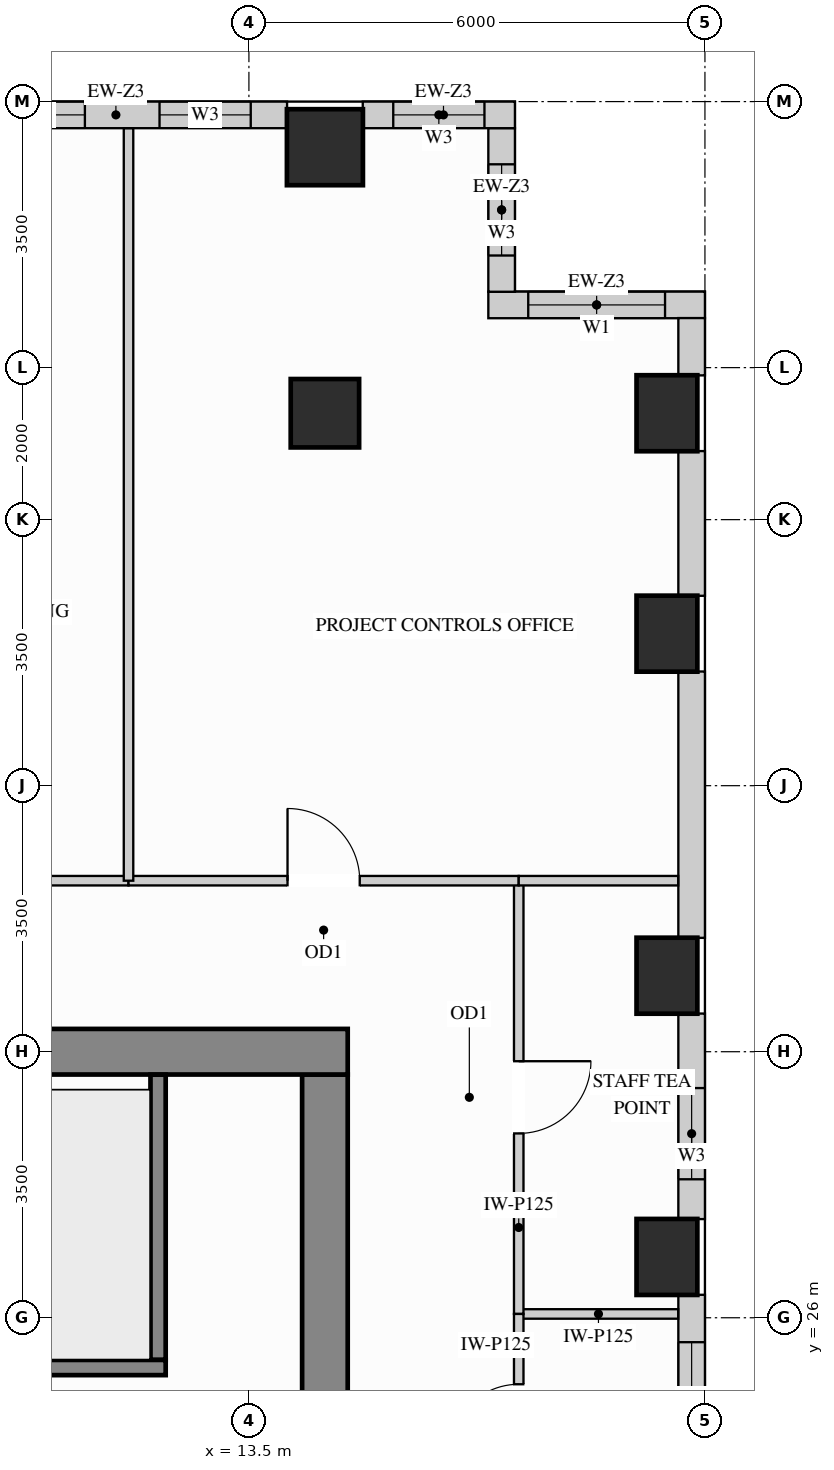
"""IFC4 building model, lengths in metres.
Left out: names, types, materials, properties, quantities, classifications, styles, units other than length and angle.
Written with IfcOpenShell. Run it as: python <this file> out.ifc"""

import sys

from ifc_helpers import new_model, si_unit, direction, frame, frame_2d, origin, origin_2d, place, context, subcontext, project, spatial, rectangle, extrude, source, transform, mapped, element, fill, save


model = new_model("IFC4")
c1 = context("Model", 3, precision=1e-05, world=origin(), true_north=direction((0.0, 1.0)))
c2 = subcontext(c1, "Body", "Model", "MODEL_VIEW")
j1 = project(units=[si_unit("LENGTHUNIT", "METRE"), si_unit("PLANEANGLEUNIT", "RADIAN")], contexts=[c1])
p1 = place(None, origin())
s1 = spatial("IfcSite", under=j1, at=p1, CompositionType="ELEMENT")
p2 = place(p1, origin())
s2 = spatial("IfcBuilding", under=s1, at=p2, CompositionType="ELEMENT")
p3 = place(p2, frame((0.0, 0.0, 175.5)))
s3 = spatial("IfcBuildingStorey", under=s2, at=p3, CompositionType="ELEMENT", Elevation=175.5)
m1 = source(origin(), c2, "Body", "SweptSolid", [
    extrude(rectangle(XDim=0.9, YDim=0.9, at=origin_2d()), origin(), (0.0, 0.0, 1.0), 3.4),
])
p4 = place(p3, frame((14.5, 37.9, 0.0), z_axis=(0.0, 0.0, 1.0), x_axis=(1.0, 0.0, 0.0)))
e1 = element("IfcColumn", 1, at=p4, inside=s3, PredefinedType="COLUMN", context=c2, shape_type="MappedRepresentation", body=[
    mapped(m1, transform((0.0, 0.0, 0.0), x_axis=(1.0, 0.0, 0.0), y_axis=(0.0, 1.0, 0.0), z_axis=(0.0, 0.0, 1.0))),
])
m2 = source(origin(), c2, "Body", "SweptSolid", [
    extrude(rectangle(XDim=0.8, YDim=1.0, at=origin_2d()), origin(), (0.0, 0.0, 1.0), 3.4),
])
for number, where, z_axis, x_axis in (
    (2, (19.0, 26.8, 0.0), (0.0, 0.0, 1.0), (1.0, 0.0, 0.0)),
    (3, (19.0, 30.5, 0.0), (0.0, 0.0, 1.0), (1.0, 0.0, 0.0)),
    (4, (19.0, 35.0, 0.0), (0.0, 0.0, 1.0), (1.0, 0.0, 0.0)),
    (5, (19.0, 37.9, 0.0), (0.0, 0.0, 1.0), (1.0, 0.0, 0.0)),
):
    element("IfcColumn", number, at=place(p3, frame(where, z_axis=z_axis, x_axis=x_axis)), inside=s3, PredefinedType="COLUMN", context=c2, shape_type="MappedRepresentation", body=[
        mapped(m2, transform((0.0, 0.0, 0.0), x_axis=(1.0, 0.0, 0.0), y_axis=(0.0, 1.0, 0.0), z_axis=(0.0, 0.0, 1.0))),
    ])
m3 = source(origin(), c2, "Body", "SweptSolid", [
    extrude(rectangle(XDim=1.0, YDim=1.0, at=origin_2d()), origin(), (0.0, 0.0, 1.0), 3.4),
])
p5 = place(p3, frame((14.5, 41.4, 0.0), z_axis=(0.0, 0.0, 1.0), x_axis=(1.0, 0.0, 0.0)))
e6 = element("IfcColumn", 6, at=p5, inside=s3, PredefinedType="COLUMN", context=c2, shape_type="MappedRepresentation", body=[
    mapped(m3, transform((0.0, 0.0, 0.0), x_axis=(1.0, 0.0, 0.0), y_axis=(0.0, 1.0, 0.0), z_axis=(0.0, 0.0, 1.0))),
])
m4 = source(origin(), c2, "Body", "SweptSolid", [
    extrude(rectangle(XDim=8.32, YDim=0.6, at=frame_2d((4.16, 0.0))), origin(), (0.0, 0.0, 1.0), 3.4),
])
p6 = place(p3, frame((14.5, 20.88, 0.0), z_axis=(0.0, 0.0, 1.0), x_axis=(0.0, 1.0, 0.0)))
e7 = element("IfcWall", 7, at=p6, inside=s3, PredefinedType="SHEAR", context=c2, shape_type="MappedRepresentation", body=[
    mapped(m4, transform((0.0, 0.0, 0.0), x_axis=(1.0, 0.0, 0.0), y_axis=(0.0, 1.0, 0.0), z_axis=(0.0, 0.0, 1.0))),
])
m5 = source(origin(), c2, "Body", "SweptSolid", [
    extrude(rectangle(XDim=10.6, YDim=0.6, at=frame_2d((5.3, 0.0))), origin(), (0.0, 0.0, 1.0), 3.4),
])
p7 = place(p3, frame((4.2, 29.5, 0.0), z_axis=(0.0, 0.0, 1.0), x_axis=(1.0, 0.0, 0.0)))
e8 = element("IfcWall", 8, at=p7, inside=s3, PredefinedType="SHEAR", context=c2, shape_type="MappedRepresentation", body=[
    mapped(m5, transform((0.0, 0.0, 0.0), x_axis=(1.0, 0.0, 0.0), y_axis=(0.0, 1.0, 0.0), z_axis=(0.0, 0.0, 1.0))),
])
p8 = place(p3, frame((19.5, 39.325, 0.0), z_axis=(0.0, 0.0, 1.0), x_axis=(-1.0, 0.0, 0.0)))
e9 = element("IfcWall", 9, at=p8, inside=s3, PredefinedType="SOLIDWALL", context=c2, shape_type="SweptSolid", body=[
    extrude(rectangle(XDim=2.85, YDim=0.35, at=frame_2d((1.425, 0.0))), origin(), (0.0, 0.0, 1.0), 3.385),
])
p9 = place(p8, frame((0.525, 0.0, 0.78)))
e10 = element("IfcOpeningElement", 10, at=p9, cuts=e9, PredefinedType="OPENING", context=c2, shape_type="SweptSolid", body=[
    extrude(rectangle(XDim=1.8, YDim=2.1, at=frame_2d((0.9, 1.05))), frame((0.0, 0.185, 0.0), z_axis=(0.0, -1.0, 0.0), x_axis=(1.0, 0.0, 0.0)), (0.0, 0.0, 1.0), 0.37),
])
p10 = place(p3, frame((16.825, 39.498, 0.0), z_axis=(0.0, 0.0, 1.0), x_axis=(0.0, 1.0, 0.0)))
e11 = element("IfcWall", 11, at=p10, inside=s3, PredefinedType="SOLIDWALL", context=c2, shape_type="SweptSolid", body=[
    extrude(rectangle(XDim=2.154, YDim=0.35, at=frame_2d((1.077, 0.0))), origin(), (0.0, 0.0, 1.0), 3.385),
])
p11 = place(p10, frame((0.477, 0.0, 0.78)))
e12 = element("IfcOpeningElement", 12, at=p11, cuts=e11, PredefinedType="OPENING", context=c2, shape_type="SweptSolid", body=[
    extrude(rectangle(XDim=1.2, YDim=2.1, at=frame_2d((0.6, 1.05))), frame((0.0, 0.185, 0.0), z_axis=(0.0, -1.0, 0.0), x_axis=(1.0, 0.0, 0.0)), (0.0, 0.0, 1.0), 0.37),
])
p12 = place(p3, frame((17.0, 41.825, 0.0), z_axis=(0.0, 0.0, 1.0), x_axis=(-1.0, 0.0, 0.0)))
e13 = element("IfcWall", 13, at=p12, inside=s3, PredefinedType="SOLIDWALL", context=c2, shape_type="SweptSolid", body=[
    extrude(rectangle(XDim=2.002, YDim=0.35, at=frame_2d((1.001, 0.0))), origin(), (0.0, 0.0, 1.0), 3.385),
])
p13 = place(p12, frame((0.401, 0.0, 0.78)))
e14 = element("IfcOpeningElement", 14, at=p13, cuts=e13, PredefinedType="OPENING", context=c2, shape_type="SweptSolid", body=[
    extrude(rectangle(XDim=1.2, YDim=2.1, at=frame_2d((0.6, 1.05))), frame((0.0, 0.185, 0.0), z_axis=(0.0, -1.0, 0.0), x_axis=(1.0, 0.0, 0.0)), (0.0, 0.0, 1.0), 0.37),
])
p14 = place(p3, frame((14.002, 41.825, 0.0), z_axis=(0.0, 0.0, 1.0), x_axis=(-1.0, 0.0, 0.0)))
e15 = element("IfcWall", 15, at=p14, inside=s3, PredefinedType="SOLIDWALL", context=c2, shape_type="SweptSolid", body=[
    extrude(rectangle(XDim=4.504, YDim=0.35, at=frame_2d((2.252, 0.0))), origin(), (0.0, 0.0, 1.0), 2.612),
])
p15 = place(p14, frame((0.478, 0.0, 0.78)))
e16 = element("IfcOpeningElement", 16, at=p15, cuts=e15, PredefinedType="OPENING", context=c2, shape_type="SweptSolid", body=[
    extrude(rectangle(XDim=1.2, YDim=1.652, at=frame_2d((0.6, 0.826))), frame((0.0, 0.185, 0.0), z_axis=(0.0, -1.0, 0.0), x_axis=(1.0, 0.0, 0.0)), (0.0, 0.0, 1.0), 0.37),
])
p16 = place(p14, frame((2.66, 0.0, 0.78)))
e17 = element("IfcOpeningElement", 17, at=p16, cuts=e15, PredefinedType="OPENING", context=c2, shape_type="SweptSolid", body=[
    extrude(rectangle(XDim=1.2, YDim=1.652, at=frame_2d((0.6, 0.826))), frame((0.0, 0.185, 0.0), z_axis=(0.0, -1.0, 0.0), x_axis=(1.0, 0.0, 0.0)), (0.0, 0.0, 1.0), 0.37),
])
p17 = place(p3, frame((19.325, 22.998, 0.0), z_axis=(0.0, 0.0, 1.0), x_axis=(0.0, 1.0, 0.0)))
e18 = element("IfcWall", 18, at=p17, inside=s3, PredefinedType="SOLIDWALL", context=c2, shape_type="SweptSolid", body=[
    extrude(rectangle(XDim=3.304, YDim=0.35, at=frame_2d((1.652, 0.0))), origin(), (0.0, 0.0, 1.0), 2.612),
])
p18 = place(p17, frame((1.18, 0.0, 0.78)))
e19 = element("IfcOpeningElement", 19, at=p18, cuts=e18, PredefinedType="OPENING", context=c2, shape_type="SweptSolid", body=[
    extrude(rectangle(XDim=1.5, YDim=1.652, at=frame_2d((0.75, 0.826))), frame((0.0, 0.185, 0.0), z_axis=(0.0, -1.0, 0.0), x_axis=(1.0, 0.0, 0.0)), (0.0, 0.0, 1.0), 0.37),
])
p19 = place(p3, frame((19.325, 27.298, 0.0), z_axis=(0.0, 0.0, 1.0), x_axis=(0.0, 1.0, 0.0)))
e20 = element("IfcWall", 20, at=p19, inside=s3, PredefinedType="SOLIDWALL", context=c2, shape_type="SweptSolid", body=[
    extrude(rectangle(XDim=2.704, YDim=0.35, at=frame_2d((1.352, 0.0))), origin(), (0.0, 0.0, 1.0), 2.612),
])
p20 = place(p19, frame((0.524, 0.0, 0.78)))
e21 = element("IfcOpeningElement", 21, at=p20, cuts=e20, PredefinedType="OPENING", context=c2, shape_type="SweptSolid", body=[
    extrude(rectangle(XDim=1.2, YDim=1.652, at=frame_2d((0.6, 0.826))), frame((0.0, 0.185, 0.0), z_axis=(0.0, -1.0, 0.0), x_axis=(1.0, 0.0, 0.0)), (0.0, 0.0, 1.0), 0.37),
])
m6 = source(origin(), c2, "Body", "SweptSolid", [
    extrude(rectangle(XDim=3.504, YDim=0.35, at=frame_2d((1.752, 0.0))), origin(), (0.0, 0.0, 1.0), 2.612),
])
p21 = place(p3, frame((19.325, 30.998, 0.0), z_axis=(0.0, 0.0, 1.0), x_axis=(0.0, 1.0, 0.0)))
e22 = element("IfcWall", 22, at=p21, inside=s3, PredefinedType="SOLIDWALL", context=c2, shape_type="MappedRepresentation", body=[
    mapped(m6, transform((0.0, 0.0, 0.0), x_axis=(1.0, 0.0, 0.0), y_axis=(0.0, 1.0, 0.0), z_axis=(0.0, 0.0, 1.0))),
])
m7 = source(origin(), c2, "Body", "SweptSolid", [
    extrude(rectangle(XDim=1.904, YDim=0.35, at=frame_2d((0.952, 0.0))), origin(), (0.0, 0.0, 1.0), 2.612),
])
p22 = place(p3, frame((19.325, 35.498, 0.0), z_axis=(0.0, 0.0, 1.0), x_axis=(0.0, 1.0, 0.0)))
e23 = element("IfcWall", 23, at=p22, inside=s3, PredefinedType="SOLIDWALL", context=c2, shape_type="MappedRepresentation", body=[
    mapped(m7, transform((0.0, 0.0, 0.0), x_axis=(1.0, 0.0, 0.0), y_axis=(0.0, 1.0, 0.0), z_axis=(0.0, 0.0, 1.0))),
])
m8 = source(origin(), c2, "Body", "SweptSolid", [
    extrude(rectangle(XDim=0.754, YDim=0.35, at=frame_2d((0.377, 0.0))), origin(), (0.0, 0.0, 1.0), 3.385),
])
p23 = place(p3, frame((19.325, 38.398, 0.0), z_axis=(0.0, 0.0, 1.0), x_axis=(0.0, 1.0, 0.0)))
e24 = element("IfcWall", 24, at=p23, inside=s3, PredefinedType="SOLIDWALL", context=c2, shape_type="MappedRepresentation", body=[
    mapped(m8, transform((0.0, 0.0, 0.0), x_axis=(1.0, 0.0, 0.0), y_axis=(0.0, 1.0, 0.0), z_axis=(0.0, 0.0, 1.0))),
])
m9 = source(origin(), c2, "Body", "SweptSolid", [
    extrude(rectangle(XDim=2.098, YDim=0.125, at=frame_2d((1.049, 0.0))), origin(), (0.0, 0.0, 1.0), 3.385),
])
p24 = place(p3, frame((17.05, 26.05, 0.0), z_axis=(0.0, 0.0, 1.0), x_axis=(1.0, 0.0, 0.0)))
e25 = element("IfcWall", 25, at=p24, inside=s3, PredefinedType="PARTITIONING", context=c2, shape_type="MappedRepresentation", body=[
    mapped(m9, transform((0.0, 0.0, 0.0), x_axis=(1.0, 0.0, 0.0), y_axis=(0.0, 1.0, 0.0), z_axis=(0.0, 0.0, 1.0))),
])
p25 = place(p3, frame((17.05, 26.05, 0.0), z_axis=(0.0, 0.0, 1.0), x_axis=(0.0, 1.0, 0.0)))
e26 = element("IfcWall", 26, at=p25, inside=s3, PredefinedType="PARTITIONING", context=c2, shape_type="SweptSolid", body=[
    extrude(rectangle(XDim=5.7, YDim=0.125, at=frame_2d((2.85, 0.0))), origin(), (0.0, 0.0, 1.0), 3.385),
])
p26 = place(p25, frame((2.375, 0.0, 0.0)))
e27 = element("IfcOpeningElement", 27, at=p26, cuts=e26, PredefinedType="OPENING", context=c2, shape_type="SweptSolid", body=[
    extrude(rectangle(XDim=0.95, YDim=2.15, at=frame_2d((0.475, 1.075))), frame((0.0, 0.073, 0.0), z_axis=(0.0, -1.0, 0.0), x_axis=(1.0, 0.0, 0.0)), (0.0, 0.0, 1.0), 0.145),
])
p27 = place(p3, frame((17.05, 23.35, 0.0), z_axis=(0.0, 0.0, 1.0), x_axis=(0.0, 1.0, 0.0)))
e28 = element("IfcWall", 28, at=p27, inside=s3, PredefinedType="PARTITIONING", context=c2, shape_type="SweptSolid", body=[
    extrude(rectangle(XDim=2.7, YDim=0.125, at=frame_2d((1.35, 0.0))), origin(), (0.0, 0.0, 1.0), 3.385),
])
p28 = place(p27, frame((0.875, 0.0, 0.0)))
e29 = element("IfcOpeningElement", 29, at=p28, cuts=e28, PredefinedType="OPENING", context=c2, shape_type="SweptSolid", body=[
    extrude(rectangle(XDim=0.9, YDim=2.15, at=frame_2d((0.45, 1.075))), frame((0.0, 0.073, 0.0), z_axis=(0.0, -1.0, 0.0), x_axis=(1.0, 0.0, 0.0)), (0.0, 0.0, 1.0), 0.145),
])
p29 = place(p3, frame((7.121, 31.75, 0.0), z_axis=(0.0, 0.0, 1.0), x_axis=(1.0, 0.0, 0.0)))
e30 = element("IfcWall", 30, at=p29, inside=s3, PredefinedType="PARTITIONING", context=c2, shape_type="SweptSolid", body=[
    extrude(rectangle(XDim=4.795, YDim=0.125, at=frame_2d((2.397, 0.0))), origin(), (0.0, 0.0, 1.0), 2.848),
])
p30 = place(p29, frame((1.923, 0.0, 0.0)))
e31 = element("IfcOpeningElement", 31, at=p30, cuts=e30, PredefinedType="OPENING", context=c2, shape_type="SweptSolid", body=[
    extrude(rectangle(XDim=0.95, YDim=2.15, at=frame_2d((0.475, 1.075))), frame((0.0, 0.073, 0.0), z_axis=(0.0, -1.0, 0.0), x_axis=(1.0, 0.0, 0.0)), (0.0, 0.0, 1.0), 0.145),
])
p31 = place(p3, frame((11.916, 31.75, 0.0), z_axis=(0.0, 0.0, 1.0), x_axis=(1.0, 0.0, 0.0)))
e32 = element("IfcWall", 32, at=p31, inside=s3, PredefinedType="PARTITIONING", context=c2, shape_type="SweptSolid", body=[
    extrude(rectangle(XDim=5.134, YDim=0.125, at=frame_2d((2.567, 0.0))), origin(), (0.0, 0.0, 1.0), 2.848),
])
p32 = place(p31, frame((2.092, 0.0, 0.0)))
e33 = element("IfcOpeningElement", 33, at=p32, cuts=e32, PredefinedType="OPENING", context=c2, shape_type="SweptSolid", body=[
    extrude(rectangle(XDim=0.95, YDim=2.15, at=frame_2d((0.475, 1.075))), frame((0.0, 0.073, 0.0), z_axis=(0.0, -1.0, 0.0), x_axis=(1.0, 0.0, 0.0)), (0.0, 0.0, 1.0), 0.145),
])
m10 = source(origin(), c2, "Body", "SweptSolid", [
    extrude(rectangle(XDim=2.098, YDim=0.125, at=frame_2d((1.049, 0.0))), origin(), (0.0, 0.0, 1.0), 2.848),
])
p33 = place(p3, frame((17.05, 31.75, 0.0), z_axis=(0.0, 0.0, 1.0), x_axis=(1.0, 0.0, 0.0)))
e34 = element("IfcWall", 34, at=p33, inside=s3, PredefinedType="PARTITIONING", context=c2, shape_type="MappedRepresentation", body=[
    mapped(m10, transform((0.0, 0.0, 0.0), x_axis=(1.0, 0.0, 0.0), y_axis=(0.0, 1.0, 0.0), z_axis=(0.0, 0.0, 1.0))),
])
m11 = source(origin(), c2, "Body", "SweptSolid", [
    extrude(rectangle(XDim=9.898, YDim=0.125, at=frame_2d((4.949, 0.0))), origin(), (0.0, 0.0, 1.0), 3.385),
])
p34 = place(p3, frame((11.916, 31.75, 0.0), z_axis=(0.0, 0.0, 1.0), x_axis=(0.0, 1.0, 0.0)))
e35 = element("IfcWall", 35, at=p34, inside=s3, PredefinedType="PARTITIONING", context=c2, shape_type="MappedRepresentation", body=[
    mapped(m11, transform((0.0, 0.0, 0.0), x_axis=(1.0, 0.0, 0.0), y_axis=(0.0, 1.0, 0.0), z_axis=(0.0, 0.0, 1.0))),
])
m12 = source(origin(), c2, "Body", "SweptSolid", [
    extrude(rectangle(XDim=3.753, YDim=0.2, at=frame_2d((1.876, 0.0))), origin(), (0.0, 0.0, 1.0), 3.4),
])
p35 = place(p3, frame((12.305, 25.445, 0.0), z_axis=(0.0, 0.0, 1.0), x_axis=(0.0, 1.0, 0.0)))
e36 = element("IfcWall", 36, at=p35, inside=s3, PredefinedType="SHEAR", context=c2, shape_type="MappedRepresentation", body=[
    mapped(m12, transform((0.0, 0.0, 0.0), x_axis=(1.0, 0.0, 0.0), y_axis=(0.0, 1.0, 0.0), z_axis=(0.0, 0.0, 1.0))),
])
p36 = place(p3, frame((4.802, 25.345, 0.0), z_axis=(0.0, 0.0, 1.0), x_axis=(1.0, 0.0, 0.0)))
e37 = element("IfcWall", 37, at=p36, inside=s3, PredefinedType="SHEAR", context=c2, shape_type="SweptSolid", body=[
    extrude(rectangle(XDim=7.603, YDim=0.2, at=frame_2d((3.802, 0.0))), origin(), (0.0, 0.0, 1.0), 3.4),
])
p37 = place(p36, frame((0.4, 0.0, 0.0)))
e38 = element("IfcOpeningElement", 38, at=p37, cuts=e37, PredefinedType="OPENING", context=c2, shape_type="SweptSolid", body=[
    extrude(rectangle(XDim=1.1, YDim=2.15, at=frame_2d((0.55, 1.075))), frame((0.0, 0.11, 0.0), z_axis=(0.0, -1.0, 0.0), x_axis=(1.0, 0.0, 0.0)), (0.0, 0.0, 1.0), 0.22),
])
m13 = source(origin(), c2, "Body", "SweptSolid", [
    extrude(rectangle(XDim=0.95, YDim=2.15, at=frame_2d((0.475, 1.075))), frame((0.0, 0.025, 0.0), z_axis=(0.0, -1.0, 0.0), x_axis=(1.0, 0.0, 0.0)), (0.0, 0.0, 1.0), 0.05),
])
p38 = place(p26, origin())
e39 = element("IfcDoor", 39, at=p38, inside=s3, OperationType="SINGLE_SWING_RIGHT", PredefinedType="DOOR", context=c2, shape_type="MappedRepresentation", body=[
    mapped(m13, transform((0.0, 0.0, 0.0), x_axis=(1.0, 0.0, 0.0), y_axis=(0.0, 1.0, 0.0), z_axis=(0.0, 0.0, 1.0))),
])
fill(e27, e39)
p39 = place(p32, origin())
e40 = element("IfcDoor", 40, at=p39, inside=s3, OperationType="SINGLE_SWING_LEFT", PredefinedType="DOOR", context=c2, shape_type="MappedRepresentation", body=[
    mapped(m13, transform((0.0, 0.0, 0.0), x_axis=(1.0, 0.0, 0.0), y_axis=(0.0, 1.0, 0.0), z_axis=(0.0, 0.0, 1.0))),
])
fill(e33, e40)
m14 = source(origin(), c2, "Body", "SweptSolid", [
    extrude(rectangle(XDim=0.9, YDim=2.15, at=frame_2d((0.45, 1.075))), frame((0.0, 0.025, 0.0), z_axis=(0.0, -1.0, 0.0), x_axis=(1.0, 0.0, 0.0)), (0.0, 0.0, 1.0), 0.05),
])
p40 = place(p28, origin())
e41 = element("IfcDoor", 41, at=p40, inside=s3, OperationType="SINGLE_SWING_LEFT", PredefinedType="DOOR", context=c2, shape_type="MappedRepresentation", body=[
    mapped(m14, transform((0.0, 0.0, 0.0), x_axis=(1.0, 0.0, 0.0), y_axis=(0.0, 1.0, 0.0), z_axis=(0.0, 0.0, 1.0))),
])
fill(e29, e41)
m15 = source(origin(), c2, "Body", "SweptSolid", [
    extrude(rectangle(XDim=1.8, YDim=2.1, at=frame_2d((0.9, 1.05))), frame((0.0, 0.03, 0.0), z_axis=(0.0, -1.0, 0.0), x_axis=(1.0, 0.0, 0.0)), (0.0, 0.0, 1.0), 0.06),
])
p41 = place(p9, origin())
e42 = element("IfcWindow", 42, at=p41, inside=s3, PartitioningType="SINGLE_PANEL", PredefinedType="WINDOW", context=c2, shape_type="MappedRepresentation", body=[
    mapped(m15, transform((0.0, 0.0, 0.0), x_axis=(1.0, 0.0, 0.0), y_axis=(0.0, 1.0, 0.0), z_axis=(0.0, 0.0, 1.0))),
])
fill(e10, e42)
m16 = source(origin(), c2, "Body", "SweptSolid", [
    extrude(rectangle(XDim=1.2, YDim=2.1, at=frame_2d((0.6, 1.05))), frame((0.0, 0.03, 0.0), z_axis=(0.0, -1.0, 0.0), x_axis=(1.0, 0.0, 0.0)), (0.0, 0.0, 1.0), 0.06),
])
p42 = place(p11, origin())
e43 = element("IfcWindow", 43, at=p42, inside=s3, PartitioningType="SINGLE_PANEL", PredefinedType="WINDOW", context=c2, shape_type="MappedRepresentation", body=[
    mapped(m16, transform((0.0, 0.0, 0.0), x_axis=(1.0, 0.0, 0.0), y_axis=(0.0, 1.0, 0.0), z_axis=(0.0, 0.0, 1.0))),
])
fill(e12, e43)
p43 = place(p13, origin())
e44 = element("IfcWindow", 44, at=p43, inside=s3, PartitioningType="SINGLE_PANEL", PredefinedType="WINDOW", context=c2, shape_type="MappedRepresentation", body=[
    mapped(m16, transform((0.0, 0.0, 0.0), x_axis=(1.0, 0.0, 0.0), y_axis=(0.0, 1.0, 0.0), z_axis=(0.0, 0.0, 1.0))),
])
fill(e14, e44)
m17 = source(origin(), c2, "Body", "SweptSolid", [
    extrude(rectangle(XDim=1.2, YDim=1.652, at=frame_2d((0.6, 0.826))), frame((0.0, 0.03, 0.0), z_axis=(0.0, -1.0, 0.0), x_axis=(1.0, 0.0, 0.0)), (0.0, 0.0, 1.0), 0.06),
])
p44 = place(p15, origin())
e45 = element("IfcWindow", 45, at=p44, inside=s3, PartitioningType="SINGLE_PANEL", PredefinedType="WINDOW", context=c2, shape_type="MappedRepresentation", body=[
    mapped(m17, transform((0.0, 0.0, 0.0), x_axis=(1.0, 0.0, 0.0), y_axis=(0.0, 1.0, 0.0), z_axis=(0.0, 0.0, 1.0))),
])
fill(e16, e45)
p45 = place(p16, origin())
e46 = element("IfcWindow", 46, at=p45, inside=s3, PartitioningType="SINGLE_PANEL", PredefinedType="WINDOW", context=c2, shape_type="MappedRepresentation", body=[
    mapped(m17, transform((0.0, 0.0, 0.0), x_axis=(1.0, 0.0, 0.0), y_axis=(0.0, 1.0, 0.0), z_axis=(0.0, 0.0, 1.0))),
])
fill(e17, e46)
p46 = place(p20, origin())
e47 = element("IfcWindow", 47, at=p46, inside=s3, PartitioningType="SINGLE_PANEL", PredefinedType="WINDOW", context=c2, shape_type="MappedRepresentation", body=[
    mapped(m17, transform((0.0, 0.0, 0.0), x_axis=(1.0, 0.0, 0.0), y_axis=(0.0, 1.0, 0.0), z_axis=(0.0, 0.0, 1.0))),
])
fill(e21, e47)
m18 = source(origin(), c2, "Body", "SweptSolid", [
    extrude(rectangle(XDim=1.5, YDim=1.652, at=frame_2d((0.75, 0.826))), frame((0.0, 0.03, 0.0), z_axis=(0.0, -1.0, 0.0), x_axis=(1.0, 0.0, 0.0)), (0.0, 0.0, 1.0), 0.06),
])
p47 = place(p18, origin())
e48 = element("IfcWindow", 48, at=p47, inside=s3, PartitioningType="SINGLE_PANEL", PredefinedType="WINDOW", context=c2, shape_type="MappedRepresentation", body=[
    mapped(m18, transform((0.0, 0.0, 0.0), x_axis=(1.0, 0.0, 0.0), y_axis=(0.0, 1.0, 0.0), z_axis=(0.0, 0.0, 1.0))),
])
fill(e19, e48)
save(model, sys.argv[1])
